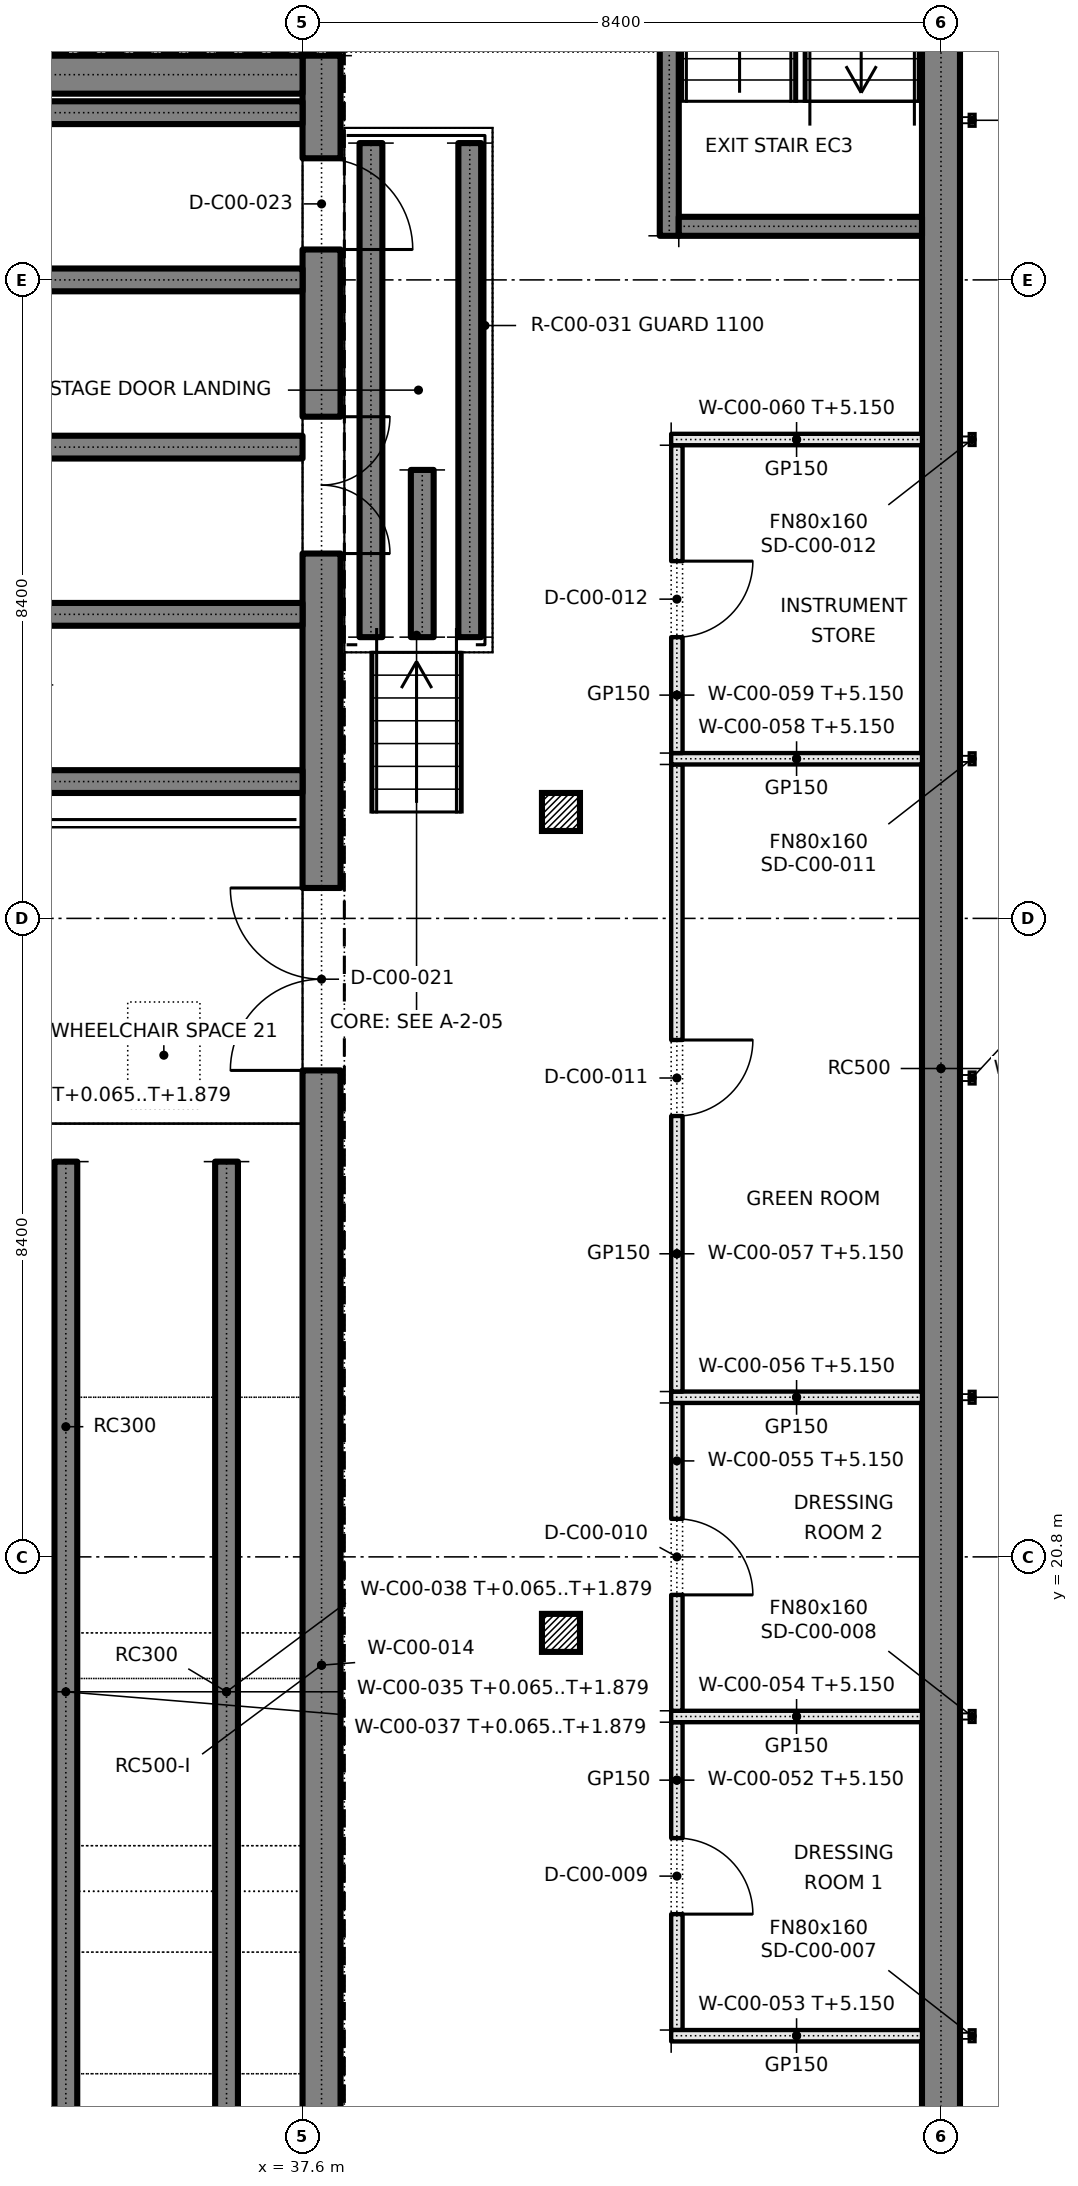
"""IFC4 building model, lengths in metres.
Left out: names, types, materials, properties, quantities, classifications, styles, units other than length and angle.
Written with IfcOpenShell. Run it as: python <this file> out.ifc"""

import sys

from ifc_helpers import new_model, si_unit, direction, frame, frame_2d, origin, origin_2d, place, context, subcontext, project, spatial, polyline, rectangle, outline, extrude, element, fill, save


model = new_model("IFC4")
c1 = context("Model", 3, precision=1e-05, world=origin(), true_north=direction((0.0, 1.0)))
c2 = subcontext(c1, "Body", "Model", "MODEL_VIEW")
j1 = project(units=[si_unit("LENGTHUNIT", "METRE"), si_unit("PLANEANGLEUNIT", "RADIAN")], contexts=[c1])
p1 = place(None, origin())
s1 = spatial("IfcSite", under=j1, at=p1, CompositionType="ELEMENT")
p2 = place(p1, origin())
s2 = spatial("IfcBuilding", under=s1, at=p2, CompositionType="ELEMENT")
p3 = place(p2, origin())
s3 = spatial("IfcBuildingStorey", under=s2, at=p3, CompositionType="ELEMENT", Elevation=0.0)
p4 = place(p3, frame((46.0, 3.75, 0.0), z_axis=(0.0, 0.0, 1.0), x_axis=(0.0, 1.0, 0.0)))
e1 = element("IfcWall", 1, at=p4, inside=s3, PredefinedType="SOLIDWALL", context=c2, shape_type="SweptSolid", body=[
    extrude(rectangle(XDim=42.5, YDim=0.5, at=frame_2d((21.25, 0.0))), origin(), (0.0, 0.0, 1.0), 5.4),
])
p5 = place(p4, frame((2.05, 0.0, 0.0)))
e2 = element("IfcOpeningElement", 2, at=p5, cuts=e1, PredefinedType="OPENING", context=c2, shape_type="SweptSolid", body=[
    extrude(rectangle(XDim=2.4, YDim=2.5, at=frame_2d((1.2, 1.25))), frame((0.0, 0.26, 0.0), z_axis=(0.0, -1.0, 0.0), x_axis=(1.0, 0.0, 0.0)), (0.0, 0.0, 1.0), 0.52),
])
p6 = place(p3, frame((37.85, 11.55, 0.0), z_axis=(0.0, 0.0, 1.0), x_axis=(0.0, 1.0, 0.0)))
e3 = element("IfcWall", 3, at=p6, inside=s3, PredefinedType="SOLIDWALL", context=c2, shape_type="SweptSolid", body=[
    extrude(rectangle(XDim=29.0, YDim=0.5, at=frame_2d((14.5, 0.0))), origin(), (0.0, 0.0, 1.0), 5.4),
])
p7 = place(p6, frame((15.65, 0.0, 0.0)))
e4 = element("IfcOpeningElement", 4, at=p7, cuts=e3, PredefinedType="OPENING", context=c2, shape_type="SweptSolid", body=[
    extrude(rectangle(XDim=2.4, YDim=2.1, at=frame_2d((1.2, 1.05))), frame((0.0, 0.26, 0.0), z_axis=(0.0, -1.0, 0.0), x_axis=(1.0, 0.0, 0.0)), (0.0, 0.0, 1.0), 0.52),
])
p8 = place(p6, frame((22.45, 0.0, 1.2)))
e5 = element("IfcOpeningElement", 5, at=p8, cuts=e3, PredefinedType="OPENING", context=c2, shape_type="SweptSolid", body=[
    extrude(rectangle(XDim=1.8, YDim=2.1, at=frame_2d((0.9, 1.05))), frame((0.0, 0.26, 0.0), z_axis=(0.0, -1.0, 0.0), x_axis=(1.0, 0.0, 0.0)), (0.0, 0.0, 1.0), 0.52),
])
p9 = place(p6, frame((26.45, 0.0, 1.2)))
e6 = element("IfcOpeningElement", 6, at=p9, cuts=e3, PredefinedType="OPENING", context=c2, shape_type="SweptSolid", body=[
    extrude(rectangle(XDim=1.2, YDim=2.1, at=frame_2d((0.6, 1.05))), frame((0.0, 0.26, 0.0), z_axis=(0.0, -1.0, 0.0), x_axis=(1.0, 0.0, 0.0)), (0.0, 0.0, 1.0), 0.52),
])
p10 = place(p3, frame((20.8, 40.3, 0.0), z_axis=(0.0, 0.0, 1.0), x_axis=(1.0, 0.0, 0.0)))
e7 = element("IfcWall", 7, at=p10, inside=s3, PredefinedType="SOLIDWALL", context=c2, shape_type="SweptSolid", body=[
    extrude(rectangle(XDim=16.8, YDim=0.5, at=frame_2d((8.4, 0.0))), origin(), (0.0, 0.0, 1.0), 5.4),
])
p11 = place(p3, frame((42.425, 38.18, 0.0), z_axis=(0.0, 0.0, 1.0), x_axis=(0.0, 1.0, 0.0)))
e8 = element("IfcWall", 8, at=p11, inside=s3, PredefinedType="SOLIDWALL", context=c2, shape_type="SweptSolid", body=[
    extrude(rectangle(XDim=7.57, YDim=0.25, at=frame_2d((3.785, 0.0))), origin(), (0.0, 0.0, 1.0), 5.4),
])
p12 = place(p11, frame((6.17, 0.0, 0.0)))
e9 = element("IfcOpeningElement", 9, at=p12, cuts=e8, PredefinedType="OPENING", context=c2, shape_type="SweptSolid", body=[
    extrude(rectangle(XDim=1.2, YDim=2.1, at=frame_2d((0.6, 1.05))), frame((0.0, 0.135, 0.0), z_axis=(0.0, -1.0, 0.0), x_axis=(1.0, 0.0, 0.0)), (0.0, 0.0, 1.0), 0.27),
])
p13 = place(p3, frame((42.55, 38.305, 0.0), z_axis=(0.0, 0.0, 1.0), x_axis=(1.0, 0.0, 0.0)))
e10 = element("IfcWall", 10, at=p13, inside=s3, PredefinedType="SOLIDWALL", context=c2, shape_type="SweptSolid", body=[
    extrude(rectangle(XDim=3.2, YDim=0.25, at=frame_2d((1.6, 0.0))), origin(), (0.0, 0.0, 1.0), 5.4),
])
for number, where, z_axis, x_axis in (
    (11, (41.0, 19.8, 0.0), (0.0, 0.0, 1.0), (1.0, 0.0, 0.0)),
    (12, (41.0, 30.6, 0.0), (0.0, 0.0, 1.0), (1.0, 0.0, 0.0)),
):
    element("IfcColumn", number, at=place(p3, frame(where, z_axis=z_axis, x_axis=x_axis)), inside=s3, PredefinedType="COLUMN", context=c2, shape_type="SweptSolid", body=[
        extrude(rectangle(XDim=0.5, YDim=0.5, at=origin_2d()), origin(), (0.0, 0.0, 1.0), 5.4),
    ])
for number, where, z_axis, x_axis in (
    (13, (20.8, 31.0, 0.0), (0.0, 0.0, 1.0), (1.0, 0.0, 0.0)),
    (14, (20.8, 33.2, 0.0), (0.0, 0.0, 1.0), (1.0, 0.0, 0.0)),
    (15, (20.8, 35.4, 0.0), (0.0, 0.0, 1.0), (1.0, 0.0, 0.0)),
    (16, (20.8, 37.6, 0.0), (0.0, 0.0, 1.0), (1.0, 0.0, 0.0)),
    (17, (20.8, 39.8, 0.0), (0.0, 0.0, 1.0), (1.0, 0.0, 0.0)),
):
    element("IfcWall", number, at=place(p3, frame(where, z_axis=z_axis, x_axis=x_axis)), inside=s3, PredefinedType="SOLIDWALL", context=c2, shape_type="SweptSolid", body=[
        extrude(rectangle(XDim=16.8, YDim=0.3, at=frame_2d((8.4, 0.0))), origin(), (0.0, 0.0, 1.0), 0.9),
    ])
for number, where, z_axis, x_axis in (
    (18, (38.5, 32.9, 0.0), (0.0, 0.0, 1.0), (0.0, 1.0, 0.0)),
    (19, (39.8, 32.9, 0.0), (0.0, 0.0, 1.0), (0.0, 1.0, 0.0)),
):
    element("IfcWall", number, at=place(p3, frame(where, z_axis=z_axis, x_axis=x_axis)), inside=s3, PredefinedType="SOLIDWALL", context=c2, shape_type="SweptSolid", body=[
        extrude(rectangle(XDim=6.5, YDim=0.3, at=frame_2d((3.25, 0.0))), origin(), (0.0, 0.0, 1.0), 0.9),
    ])
p14 = place(p3, frame((39.175, 32.9, 0.0), z_axis=(0.0, 0.0, 1.0), x_axis=(0.0, 1.0, 0.0)))
e20 = element("IfcWall", 20, at=p14, inside=s3, PredefinedType="SOLIDWALL", context=c2, shape_type="SweptSolid", body=[
    extrude(rectangle(XDim=2.2, YDim=0.3, at=frame_2d((1.1, 0.0))), origin(), (0.0, 0.0, 1.0), 0.9),
])
for number, where, z_axis, x_axis in (
    (21, (34.486, 12.05, 0.0), (0.0, 0.0, 1.0), (0.0, 1.0, 0.0)),
    (22, (36.6, 12.05, 0.0), (0.0, 0.0, 1.0), (0.0, 1.0, 0.0)),
):
    element("IfcWall", number, at=place(p3, frame(where, z_axis=z_axis, x_axis=x_axis)), inside=s3, PredefinedType="SOLIDWALL", context=c2, shape_type="SweptSolid", body=[
        extrude(outline(polyline([(0.0, 0.0), (13.95, 0.0), (13.95, 0.065), (0.0, 1.878), (0.0, 0.0)])), frame((0.0, 0.15, 0.0), z_axis=(0.0, -1.0, 0.0), x_axis=(1.0, 0.0, 0.0)), (0.0, 0.0, 1.0), 0.3),
    ])
p15 = place(p3, frame((46.0, 3.77, -0.41), z_axis=(0.0, 0.0, 1.0), x_axis=(0.0, 1.0, 0.0)))
e23 = element("IfcWall", 23, at=p15, inside=s3, PredefinedType="SOLIDWALL", context=c2, shape_type="SweptSolid", body=[
    extrude(rectangle(XDim=42.46, YDim=0.5, at=frame_2d((21.23, 0.0))), origin(), (0.0, 0.0, 1.0), 0.41),
])
p16 = place(p3, frame((37.85, 11.57, -0.41), z_axis=(0.0, 0.0, 1.0), x_axis=(0.0, 1.0, 0.0)))
e24 = element("IfcWall", 24, at=p16, inside=s3, PredefinedType="SOLIDWALL", context=c2, shape_type="SweptSolid", body=[
    extrude(rectangle(XDim=28.96, YDim=0.5, at=frame_2d((14.48, 0.0))), origin(), (0.0, 0.0, 1.0), 0.41),
])
p17 = place(p3, frame((20.8, 40.3, -0.3), z_axis=(0.0, 0.0, 1.0), x_axis=(1.0, 0.0, 0.0)))
e25 = element("IfcWall", 25, at=p17, inside=s3, PredefinedType="SOLIDWALL", context=c2, shape_type="SweptSolid", body=[
    extrude(rectangle(XDim=16.8, YDim=0.5, at=frame_2d((8.4, 0.0))), origin(), (0.0, 0.0, 1.0), 0.3),
])
p18 = place(p3, frame((20.8, 31.0, -0.41), z_axis=(0.0, 0.0, 1.0), x_axis=(1.0, 0.0, 0.0)))
e26 = element("IfcWall", 26, at=p18, inside=s3, PredefinedType="SOLIDWALL", context=c2, shape_type="SweptSolid", body=[
    extrude(rectangle(XDim=16.8, YDim=0.3, at=frame_2d((8.4, 0.0))), origin(), (0.0, 0.0, 1.0), 0.41),
])
for number, where, z_axis, x_axis in (
    (27, (20.8, 33.2, -0.3), (0.0, 0.0, 1.0), (1.0, 0.0, 0.0)),
    (28, (20.8, 35.4, -0.3), (0.0, 0.0, 1.0), (1.0, 0.0, 0.0)),
    (29, (20.8, 37.6, -0.3), (0.0, 0.0, 1.0), (1.0, 0.0, 0.0)),
    (30, (20.8, 39.8, -0.3), (0.0, 0.0, 1.0), (1.0, 0.0, 0.0)),
):
    element("IfcWall", number, at=place(p3, frame(where, z_axis=z_axis, x_axis=x_axis)), inside=s3, PredefinedType="SOLIDWALL", context=c2, shape_type="SweptSolid", body=[
        extrude(rectangle(XDim=16.8, YDim=0.3, at=frame_2d((8.4, 0.0))), origin(), (0.0, 0.0, 1.0), 0.3),
    ])
for number, where, z_axis, x_axis in (
    (31, (34.486, 12.05, -0.3), (0.0, 0.0, 1.0), (0.0, 1.0, 0.0)),
    (32, (36.6, 12.05, -0.3), (0.0, 0.0, 1.0), (0.0, 1.0, 0.0)),
):
    element("IfcWall", number, at=place(p3, frame(where, z_axis=z_axis, x_axis=x_axis)), inside=s3, PredefinedType="SOLIDWALL", context=c2, shape_type="SweptSolid", body=[
        extrude(rectangle(XDim=13.93, YDim=0.3, at=frame_2d((6.965, 0.0))), origin(), (0.0, 0.0, 1.0), 0.3),
    ])
p19 = place(p3, frame((42.525, 14.575, 0.0), z_axis=(0.0, 0.0, 1.0), x_axis=(0.0, 1.0, 0.0)))
e33 = element("IfcWall", 33, at=p19, inside=s3, PredefinedType="PARTITIONING", context=c2, shape_type="SweptSolid", body=[
    extrude(rectangle(XDim=4.05, YDim=0.15, at=frame_2d((2.025, 0.0))), origin(), (0.0, 0.0, 1.0), 5.15),
])
p20 = place(p19, frame((1.525, 0.0, 0.0)))
e34 = element("IfcOpeningElement", 34, at=p20, cuts=e33, PredefinedType="OPENING", context=c2, shape_type="SweptSolid", body=[
    extrude(rectangle(XDim=1.0, YDim=2.1, at=frame_2d((0.5, 1.05))), frame((0.0, 0.085, 0.0), z_axis=(0.0, -1.0, 0.0), x_axis=(1.0, 0.0, 0.0)), (0.0, 0.0, 1.0), 0.17),
])
for number, where, z_axis, x_axis in (
    (35, (42.45, 14.5, 0.0), (0.0, 0.0, 1.0), (1.0, 0.0, 0.0)),
    (36, (42.45, 18.7, 0.0), (0.0, 0.0, 1.0), (1.0, 0.0, 0.0)),
):
    element("IfcWall", number, at=place(p3, frame(where, z_axis=z_axis, x_axis=x_axis)), inside=s3, PredefinedType="PARTITIONING", context=c2, shape_type="SweptSolid", body=[
        extrude(rectangle(XDim=3.3, YDim=0.15, at=frame_2d((1.65, 0.0))), origin(), (0.0, 0.0, 1.0), 5.15),
    ])
p21 = place(p3, frame((42.525, 18.775, 0.0), z_axis=(0.0, 0.0, 1.0), x_axis=(0.0, 1.0, 0.0)))
e37 = element("IfcWall", 37, at=p21, inside=s3, PredefinedType="PARTITIONING", context=c2, shape_type="SweptSolid", body=[
    extrude(rectangle(XDim=4.05, YDim=0.15, at=frame_2d((2.025, 0.0))), origin(), (0.0, 0.0, 1.0), 5.15),
])
p22 = place(p21, frame((1.525, 0.0, 0.0)))
e38 = element("IfcOpeningElement", 38, at=p22, cuts=e37, PredefinedType="OPENING", context=c2, shape_type="SweptSolid", body=[
    extrude(rectangle(XDim=1.0, YDim=2.1, at=frame_2d((0.5, 1.05))), frame((0.0, 0.085, 0.0), z_axis=(0.0, -1.0, 0.0), x_axis=(1.0, 0.0, 0.0)), (0.0, 0.0, 1.0), 0.17),
])
p23 = place(p3, frame((42.45, 22.9, 0.0), z_axis=(0.0, 0.0, 1.0), x_axis=(1.0, 0.0, 0.0)))
e39 = element("IfcWall", 39, at=p23, inside=s3, PredefinedType="PARTITIONING", context=c2, shape_type="SweptSolid", body=[
    extrude(rectangle(XDim=3.3, YDim=0.15, at=frame_2d((1.65, 0.0))), origin(), (0.0, 0.0, 1.0), 5.15),
])
p24 = place(p3, frame((42.525, 22.975, 0.0), z_axis=(0.0, 0.0, 1.0), x_axis=(0.0, 1.0, 0.0)))
e40 = element("IfcWall", 40, at=p24, inside=s3, PredefinedType="PARTITIONING", context=c2, shape_type="SweptSolid", body=[
    extrude(rectangle(XDim=8.25, YDim=0.15, at=frame_2d((4.125, 0.0))), origin(), (0.0, 0.0, 1.0), 5.15),
])
p25 = place(p24, frame((3.625, 0.0, 0.0)))
e41 = element("IfcOpeningElement", 41, at=p25, cuts=e40, PredefinedType="OPENING", context=c2, shape_type="SweptSolid", body=[
    extrude(rectangle(XDim=1.0, YDim=2.1, at=frame_2d((0.5, 1.05))), frame((0.0, 0.085, 0.0), z_axis=(0.0, -1.0, 0.0), x_axis=(1.0, 0.0, 0.0)), (0.0, 0.0, 1.0), 0.17),
])
p26 = place(p3, frame((42.45, 31.3, 0.0), z_axis=(0.0, 0.0, 1.0), x_axis=(1.0, 0.0, 0.0)))
e42 = element("IfcWall", 42, at=p26, inside=s3, PredefinedType="PARTITIONING", context=c2, shape_type="SweptSolid", body=[
    extrude(rectangle(XDim=3.3, YDim=0.15, at=frame_2d((1.65, 0.0))), origin(), (0.0, 0.0, 1.0), 5.15),
])
p27 = place(p3, frame((42.525, 31.375, 0.0), z_axis=(0.0, 0.0, 1.0), x_axis=(0.0, 1.0, 0.0)))
e43 = element("IfcWall", 43, at=p27, inside=s3, PredefinedType="PARTITIONING", context=c2, shape_type="SweptSolid", body=[
    extrude(rectangle(XDim=4.05, YDim=0.15, at=frame_2d((2.025, 0.0))), origin(), (0.0, 0.0, 1.0), 5.15),
])
p28 = place(p27, frame((1.525, 0.0, 0.0)))
e44 = element("IfcOpeningElement", 44, at=p28, cuts=e43, PredefinedType="OPENING", context=c2, shape_type="SweptSolid", body=[
    extrude(rectangle(XDim=1.0, YDim=2.1, at=frame_2d((0.5, 1.05))), frame((0.0, 0.085, 0.0), z_axis=(0.0, -1.0, 0.0), x_axis=(1.0, 0.0, 0.0)), (0.0, 0.0, 1.0), 0.17),
])
p29 = place(p3, frame((42.45, 35.5, 0.0), z_axis=(0.0, 0.0, 1.0), x_axis=(1.0, 0.0, 0.0)))
e45 = element("IfcWall", 45, at=p29, inside=s3, PredefinedType="PARTITIONING", context=c2, shape_type="SweptSolid", body=[
    extrude(rectangle(XDim=3.3, YDim=0.15, at=frame_2d((1.65, 0.0))), origin(), (0.0, 0.0, 1.0), 5.15),
])
p30 = place(p20, frame((1.0, 0.0, 0.0), z_axis=(0.0, 0.0, 1.0), x_axis=(-1.0, 0.0, 0.0)))
e46 = element("IfcDoor", 46, at=p30, inside=s3, OperationType="SINGLE_SWING_RIGHT", PredefinedType="DOOR", context=c2, shape_type="SweptSolid", body=[
    extrude(rectangle(XDim=1.0, YDim=2.1, at=frame_2d((0.5, 1.05))), frame((0.0, 0.025, 0.0), z_axis=(0.0, -1.0, 0.0), x_axis=(1.0, 0.0, 0.0)), (0.0, 0.0, 1.0), 0.05),
])
fill(e34, e46)
p31 = place(p22, frame((1.0, 0.0, 0.0), z_axis=(0.0, 0.0, 1.0), x_axis=(-1.0, 0.0, 0.0)))
e47 = element("IfcDoor", 47, at=p31, inside=s3, OperationType="SINGLE_SWING_RIGHT", PredefinedType="DOOR", context=c2, shape_type="SweptSolid", body=[
    extrude(rectangle(XDim=1.0, YDim=2.1, at=frame_2d((0.5, 1.05))), frame((0.0, 0.025, 0.0), z_axis=(0.0, -1.0, 0.0), x_axis=(1.0, 0.0, 0.0)), (0.0, 0.0, 1.0), 0.05),
])
fill(e38, e47)
p32 = place(p25, frame((1.0, 0.0, 0.0), z_axis=(0.0, 0.0, 1.0), x_axis=(-1.0, 0.0, 0.0)))
e48 = element("IfcDoor", 48, at=p32, inside=s3, OperationType="SINGLE_SWING_LEFT", PredefinedType="DOOR", context=c2, shape_type="SweptSolid", body=[
    extrude(rectangle(XDim=1.0, YDim=2.1, at=frame_2d((0.5, 1.05))), frame((0.0, 0.025, 0.0), z_axis=(0.0, -1.0, 0.0), x_axis=(1.0, 0.0, 0.0)), (0.0, 0.0, 1.0), 0.05),
])
fill(e41, e48)
p33 = place(p28, frame((1.0, 0.0, 0.0), z_axis=(0.0, 0.0, 1.0), x_axis=(-1.0, 0.0, 0.0)))
e49 = element("IfcDoor", 49, at=p33, inside=s3, OperationType="SINGLE_SWING_LEFT", PredefinedType="DOOR", context=c2, shape_type="SweptSolid", body=[
    extrude(rectangle(XDim=1.0, YDim=2.1, at=frame_2d((0.5, 1.05))), frame((0.0, 0.025, 0.0), z_axis=(0.0, -1.0, 0.0), x_axis=(1.0, 0.0, 0.0)), (0.0, 0.0, 1.0), 0.05),
])
fill(e44, e49)
p34 = place(p7, origin())
e50 = element("IfcDoor", 50, at=p34, inside=s3, OperationType="DOUBLE_DOOR_SINGLE_SWING", PredefinedType="DOOR", context=c2, shape_type="SweptSolid", body=[
    extrude(rectangle(XDim=2.4, YDim=2.1, at=frame_2d((1.2, 1.05))), frame((0.0, 0.025, 0.0), z_axis=(0.0, -1.0, 0.0), x_axis=(1.0, 0.0, 0.0)), (0.0, 0.0, 1.0), 0.05),
])
fill(e4, e50)
p35 = place(p8, frame((1.8, 0.0, 0.0), z_axis=(0.0, 0.0, 1.0), x_axis=(-1.0, 0.0, 0.0)))
e51 = element("IfcDoor", 51, at=p35, inside=s3, OperationType="DOUBLE_DOOR_SINGLE_SWING", PredefinedType="DOOR", context=c2, shape_type="SweptSolid", body=[
    extrude(rectangle(XDim=1.8, YDim=2.1, at=frame_2d((0.9, 1.05))), frame((0.0, 0.025, 0.0), z_axis=(0.0, -1.0, 0.0), x_axis=(1.0, 0.0, 0.0)), (0.0, 0.0, 1.0), 0.05),
])
fill(e5, e51)
p36 = place(p9, frame((1.2, 0.0, 0.0), z_axis=(0.0, 0.0, 1.0), x_axis=(-1.0, 0.0, 0.0)))
e52 = element("IfcDoor", 52, at=p36, inside=s3, OperationType="SINGLE_SWING_RIGHT", PredefinedType="DOOR", context=c2, shape_type="SweptSolid", body=[
    extrude(rectangle(XDim=1.2, YDim=2.1, at=frame_2d((0.6, 1.05))), frame((0.0, 0.025, 0.0), z_axis=(0.0, -1.0, 0.0), x_axis=(1.0, 0.0, 0.0)), (0.0, 0.0, 1.0), 0.05),
])
fill(e6, e52)
save(model, sys.argv[1])
